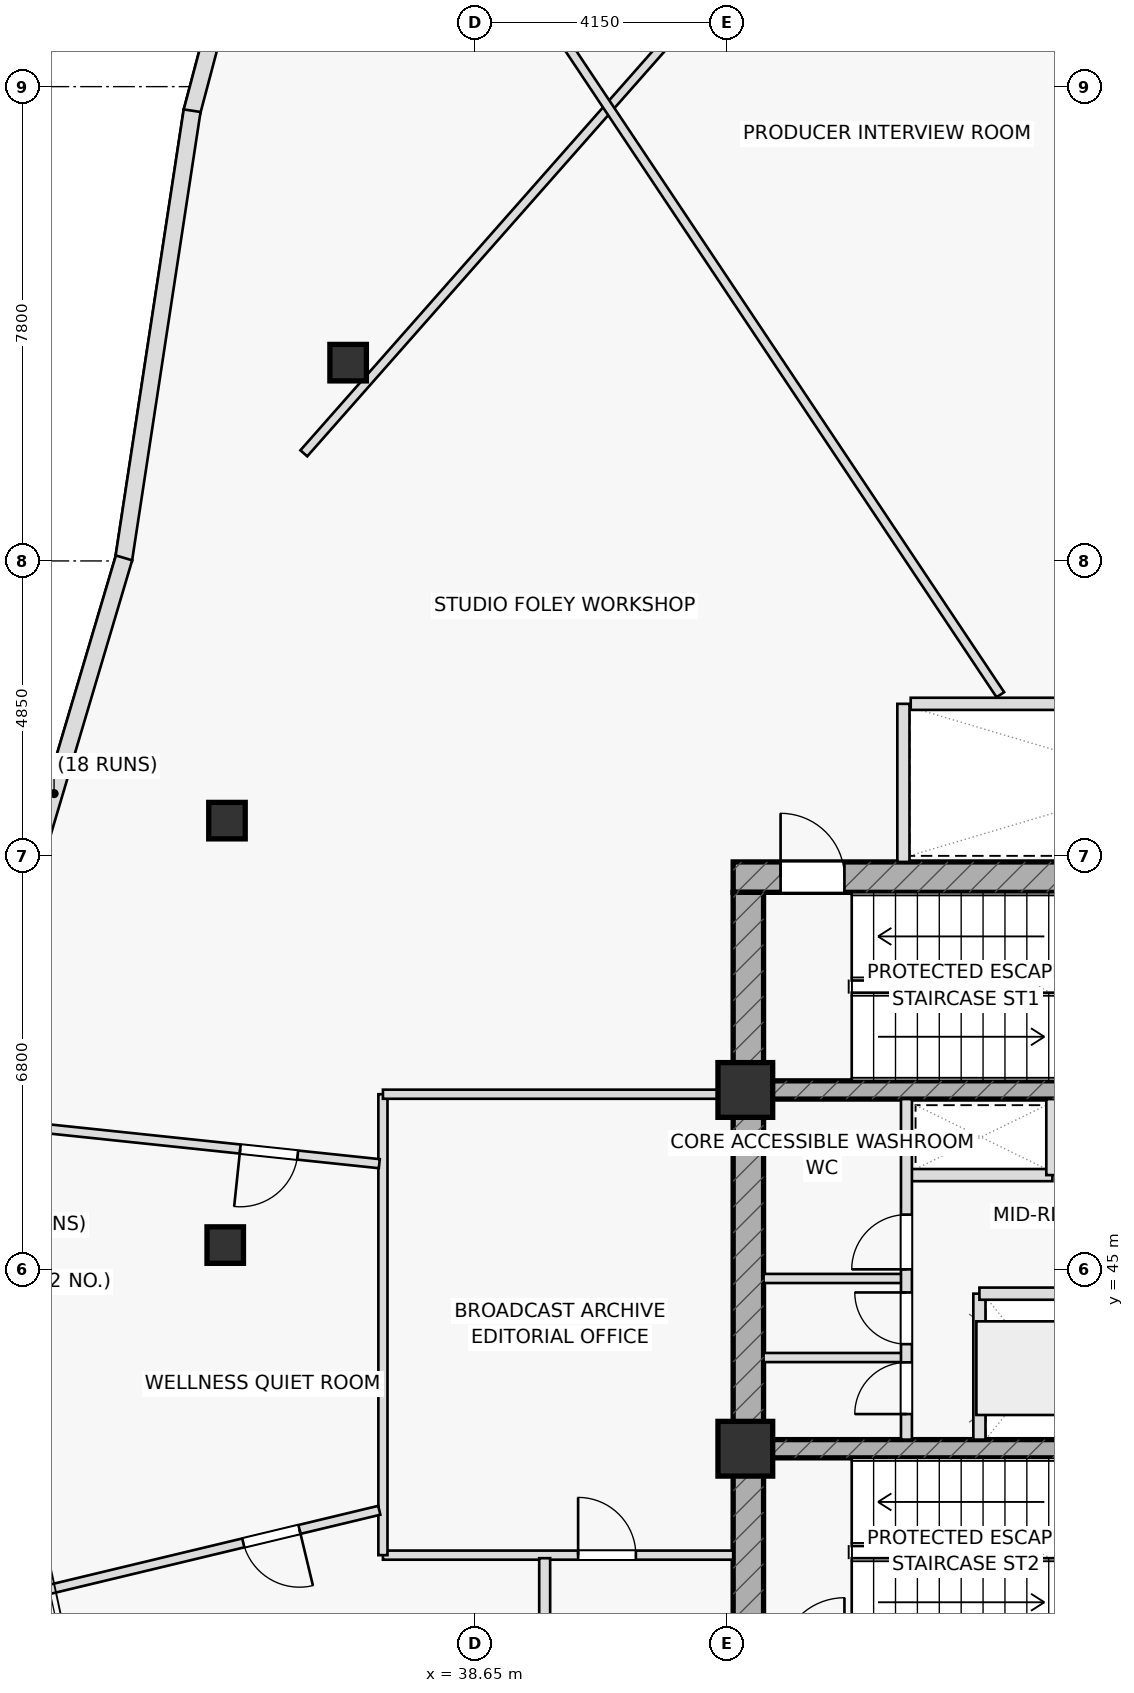
"""IFC4 building model, lengths in metres.
Left out: names, types, materials, properties, quantities, classifications, styles, units other than length and angle.
Written with IfcOpenShell. Run it as: python <this file> out.ifc"""

import sys

from ifc_helpers import new_model, si_unit, direction, frame, frame_2d, origin, origin_2d, place, context, subcontext, project, spatial, rectangle, hollow_rectangle, extrude, element, fill, save


model = new_model("IFC4")
c1 = context("Model", 3, precision=1e-05, world=origin(), true_north=direction((0.0, 1.0)))
c2 = subcontext(c1, "Body", "Model", "MODEL_VIEW")
j1 = project(units=[si_unit("LENGTHUNIT", "METRE"), si_unit("PLANEANGLEUNIT", "RADIAN")], contexts=[c1])
p1 = place(None, origin())
s1 = spatial("IfcSite", under=j1, at=p1, CompositionType="ELEMENT")
p2 = place(p1, origin())
s2 = spatial("IfcBuilding", under=s1, at=p2, CompositionType="ELEMENT")
p3 = place(p2, frame((0.0, 0.0, 196.45)))
s3 = spatial("IfcBuildingStorey", under=s2, at=p3, CompositionType="ELEMENT", Elevation=196.45)
p4 = place(p3, frame((42.9, 51.45, 0.0), z_axis=(0.0, 0.0, 1.0), x_axis=(1.0, 0.0, 0.0)))
e1 = element("IfcWall", 1, at=p4, inside=s3, PredefinedType="SHEAR", context=c2, shape_type="SweptSolid", body=[
    extrude(rectangle(XDim=14.2, YDim=0.5, at=frame_2d((7.1, 0.0))), origin(), (0.0, 0.0, 1.0), 3.55),
])
p5 = place(p4, frame((0.78, 0.0, 0.0)))
e2 = element("IfcOpeningElement", 2, at=p5, cuts=e1, PredefinedType="OPENING", context=c2, shape_type="SweptSolid", body=[
    extrude(rectangle(XDim=1.05, YDim=2.2, at=frame_2d((0.525, 1.1))), frame((0.0, 0.26, 0.0), z_axis=(0.0, -1.0, 0.0), x_axis=(1.0, 0.0, 0.0)), (0.0, 0.0, 1.0), 0.52),
])
p6 = place(p3, frame((43.15, 38.8, 0.0), z_axis=(0.0, 0.0, 1.0), x_axis=(0.0, 1.0, 0.0)))
e3 = element("IfcWall", 3, at=p6, inside=s3, PredefinedType="SHEAR", context=c2, shape_type="SweptSolid", body=[
    extrude(rectangle(XDim=12.4, YDim=0.5, at=frame_2d((6.2, 0.0))), origin(), (0.0, 0.0, 1.0), 3.55),
])
p7 = place(p3, frame((43.4, 47.95, 0.0), z_axis=(0.0, 0.0, 1.0), x_axis=(1.0, 0.0, 0.0)))
e4 = element("IfcWall", 4, at=p7, inside=s3, PredefinedType="SHEAR", context=c2, shape_type="SweptSolid", body=[
    extrude(rectangle(XDim=13.2, YDim=0.3, at=frame_2d((6.6, 0.0))), origin(), (0.0, 0.0, 1.0), 3.55),
])
p8 = place(p7, frame((8.345, 0.0, 0.0)))
e5 = element("IfcOpeningElement", 5, at=p8, cuts=e4, PredefinedType="OPENING", context=c2, shape_type="SweptSolid", body=[
    extrude(rectangle(XDim=1.15, YDim=2.2, at=frame_2d((0.575, 1.1))), frame((0.0, 0.16, 0.0), z_axis=(0.0, -1.0, 0.0), x_axis=(1.0, 0.0, 0.0)), (0.0, 0.0, 1.0), 0.32),
])
p9 = place(p7, frame((10.065, 0.0, 0.0)))
e6 = element("IfcOpeningElement", 6, at=p9, cuts=e4, PredefinedType="OPENING", context=c2, shape_type="SweptSolid", body=[
    extrude(rectangle(XDim=1.15, YDim=2.2, at=frame_2d((0.575, 1.1))), frame((0.0, 0.16, 0.0), z_axis=(0.0, -1.0, 0.0), x_axis=(1.0, 0.0, 0.0)), (0.0, 0.0, 1.0), 0.32),
])
p10 = place(p7, frame((11.645, 0.0, 0.0)))
e7 = element("IfcOpeningElement", 7, at=p10, cuts=e4, PredefinedType="OPENING", context=c2, shape_type="SweptSolid", body=[
    extrude(rectangle(XDim=1.15, YDim=2.2, at=frame_2d((0.575, 1.1))), frame((0.0, 0.16, 0.0), z_axis=(0.0, -1.0, 0.0), x_axis=(1.0, 0.0, 0.0)), (0.0, 0.0, 1.0), 0.32),
])
p11 = place(p3, frame((43.4, 42.05, 0.0), z_axis=(0.0, 0.0, 1.0), x_axis=(1.0, 0.0, 0.0)))
e8 = element("IfcWall", 8, at=p11, inside=s3, PredefinedType="SHEAR", context=c2, shape_type="SweptSolid", body=[
    extrude(rectangle(XDim=13.2, YDim=0.3, at=frame_2d((6.6, 0.0))), origin(), (0.0, 0.0, 1.0), 3.55),
])
p12 = place(p11, frame((8.37, 0.0, 0.0)))
e9 = element("IfcOpeningElement", 9, at=p12, cuts=e8, PredefinedType="OPENING", context=c2, shape_type="SweptSolid", body=[
    extrude(rectangle(XDim=1.1, YDim=2.15, at=frame_2d((0.55, 1.075))), frame((0.0, 0.16, 0.0), z_axis=(0.0, -1.0, 0.0), x_axis=(1.0, 0.0, 0.0)), (0.0, 0.0, 1.0), 0.32),
])
p13 = place(p11, frame((10.09, 0.0, 0.0)))
e10 = element("IfcOpeningElement", 10, at=p13, cuts=e8, PredefinedType="OPENING", context=c2, shape_type="SweptSolid", body=[
    extrude(rectangle(XDim=1.1, YDim=2.15, at=frame_2d((0.55, 1.075))), frame((0.0, 0.16, 0.0), z_axis=(0.0, -1.0, 0.0), x_axis=(1.0, 0.0, 0.0)), (0.0, 0.0, 1.0), 0.32),
])
p14 = place(p11, frame((11.83, 0.0, 0.0)))
e11 = element("IfcOpeningElement", 11, at=p14, cuts=e8, PredefinedType="OPENING", context=c2, shape_type="SweptSolid", body=[
    extrude(rectangle(XDim=1.1, YDim=2.15, at=frame_2d((0.55, 1.075))), frame((0.0, 0.16, 0.0), z_axis=(0.0, -1.0, 0.0), x_axis=(1.0, 0.0, 0.0)), (0.0, 0.0, 1.0), 0.32),
])
for number, where, z_axis, x_axis in (
    (12, (43.1, 47.95, 0.0), (0.0, 0.0, 1.0), (1.0, 0.0, 0.0)),
    (13, (43.1, 42.05, 0.0), (0.0, 0.0, 1.0), (1.0, 0.0, 0.0)),
):
    element("IfcColumn", number, at=place(p3, frame(where, z_axis=z_axis, x_axis=x_axis)), inside=s3, PredefinedType="COLUMN", context=c2, shape_type="SweptSolid", body=[
        extrude(rectangle(XDim=0.9, YDim=0.9, at=origin_2d()), origin(), (0.0, 0.0, 1.0), 3.55),
    ])
for number, where, z_axis, x_axis in (
    (14, (36.568, 59.911, 0.0), (0.0, 0.0, 1.0), (1.0, 0.0, 0.0)),
    (15, (34.575, 52.379, 0.0), (0.0, 0.0, 1.0), (1.0, 0.0, 0.0)),
    (16, (34.546, 45.399, 0.0), (0.0, 0.0, 1.0), (1.0, 0.0, 0.0)),
):
    element("IfcColumn", number, at=place(p3, frame(where, z_axis=z_axis, x_axis=x_axis)), inside=s3, PredefinedType="COLUMN", context=c2, shape_type="SweptSolid", body=[
        extrude(hollow_rectangle(XDim=0.6, YDim=0.6, WallThickness=0.036, at=origin_2d()), origin(), (0.0, 0.0, 1.0), 3.55),
    ])
p15 = place(p3, frame((45.7, 51.7, 0.0), z_axis=(0.0, 0.0, 1.0), x_axis=(0.0, 1.0, 0.0)))
e17 = element("IfcWall", 17, at=p15, inside=s3, PredefinedType="PARTITIONING", context=c2, shape_type="SweptSolid", body=[
    extrude(rectangle(XDim=2.6, YDim=0.2, at=frame_2d((1.3, 0.0))), origin(), (0.0, 0.0, 1.0), 3.55),
])
p16 = place(p3, frame((45.75, 46.55, 0.0), z_axis=(0.0, 0.0, 1.0), x_axis=(1.0, 0.0, 0.0)))
e18 = element("IfcWall", 18, at=p16, inside=s3, PredefinedType="PARTITIONING", context=c2, shape_type="SweptSolid", body=[
    extrude(rectangle(XDim=2.4, YDim=0.2, at=frame_2d((1.2, 0.0))), origin(), (0.0, 0.0, 1.0), 3.55),
])
p17 = place(p3, frame((48.15, 46.55, 0.0), z_axis=(0.0, 0.0, 1.0), x_axis=(0.0, 1.0, 0.0)))
e19 = element("IfcWall", 19, at=p17, inside=s3, PredefinedType="PARTITIONING", context=c2, shape_type="SweptSolid", body=[
    extrude(rectangle(XDim=1.25, YDim=0.2, at=frame_2d((0.625, 0.0))), origin(), (0.0, 0.0, 1.0), 3.55),
])
p18 = place(p3, frame((46.95, 42.2, 0.0), z_axis=(0.0, 0.0, 1.0), x_axis=(0.0, 1.0, 0.0)))
e20 = element("IfcWall", 20, at=p18, inside=s3, PredefinedType="PARTITIONING", context=c2, shape_type="SweptSolid", body=[
    extrude(rectangle(XDim=2.4, YDim=0.2, at=frame_2d((1.2, 0.0))), origin(), (0.0, 0.0, 1.0), 3.55),
])
p19 = place(p3, frame((46.95, 44.6, 0.0), z_axis=(0.0, 0.0, 1.0), x_axis=(1.0, 0.0, 0.0)))
e21 = element("IfcWall", 21, at=p19, inside=s3, PredefinedType="PARTITIONING", context=c2, shape_type="SweptSolid", body=[
    extrude(rectangle(XDim=2.05, YDim=0.2, at=frame_2d((1.025, 0.0))), origin(), (0.0, 0.0, 1.0), 3.55),
])
for number, where, z_axis, x_axis in (
    (22, (43.4, 43.55, 0.0), (0.0, 0.0, 1.0), (1.0, 0.0, 0.0)),
    (23, (43.4, 44.85, 0.0), (0.0, 0.0, 1.0), (1.0, 0.0, 0.0)),
):
    element("IfcWall", number, at=place(p3, frame(where, z_axis=z_axis, x_axis=x_axis)), inside=s3, PredefinedType="PARTITIONING", context=c2, shape_type="SweptSolid", body=[
        extrude(rectangle(XDim=2.35, YDim=0.15, at=frame_2d((1.175, 0.0))), origin(), (0.0, 0.0, 1.0), 3.55),
    ])
p20 = place(p3, frame((45.75, 42.2, 0.0), z_axis=(0.0, 0.0, 1.0), x_axis=(0.0, 1.0, 0.0)))
e24 = element("IfcWall", 24, at=p20, inside=s3, PredefinedType="PARTITIONING", context=c2, shape_type="SweptSolid", body=[
    extrude(rectangle(XDim=5.6, YDim=0.18, at=frame_2d((2.8, 0.0))), origin(), (0.0, 0.0, 1.0), 3.55),
])
p21 = place(p20, frame((0.42, 0.0, 0.0)))
e25 = element("IfcOpeningElement", 25, at=p21, cuts=e24, PredefinedType="OPENING", context=c2, shape_type="SweptSolid", body=[
    extrude(rectangle(XDim=0.85, YDim=2.05, at=frame_2d((0.425, 1.025))), frame((0.0, 0.1, 0.0), z_axis=(0.0, -1.0, 0.0), x_axis=(1.0, 0.0, 0.0)), (0.0, 0.0, 1.0), 0.2),
])
p22 = place(p20, frame((1.57, 0.0, 0.0)))
e26 = element("IfcOpeningElement", 26, at=p22, cuts=e24, PredefinedType="OPENING", context=c2, shape_type="SweptSolid", body=[
    extrude(rectangle(XDim=0.85, YDim=2.05, at=frame_2d((0.425, 1.025))), frame((0.0, 0.1, 0.0), z_axis=(0.0, -1.0, 0.0), x_axis=(1.0, 0.0, 0.0)), (0.0, 0.0, 1.0), 0.2),
])
p23 = place(p20, frame((2.8, 0.0, 0.0)))
e27 = element("IfcOpeningElement", 27, at=p23, cuts=e24, PredefinedType="OPENING", context=c2, shape_type="SweptSolid", body=[
    extrude(rectangle(XDim=0.9, YDim=2.05, at=frame_2d((0.45, 1.025))), frame((0.0, 0.1, 0.0), z_axis=(0.0, -1.0, 0.0), x_axis=(1.0, 0.0, 0.0)), (0.0, 0.0, 1.0), 0.2),
])
p24 = place(p3, frame((43.4, 66.989, 0.0), z_axis=(0.0, 0.0, 1.0), x_axis=(-0.661622343701, -0.749837231881, 0.0)))
e28 = element("IfcWall", 28, at=p24, inside=s3, PredefinedType="PARTITIONING", context=c2, shape_type="SweptSolid", body=[
    extrude(rectangle(XDim=11.427, YDim=0.15, at=frame_2d((5.714, 0.0))), origin(), (0.0, 0.0, 1.0), 2.935),
])
p25 = place(p3, frame((37.14, 40.3, 0.0), z_axis=(0.0, 0.0, 1.0), x_axis=(1.0, 0.0, 0.0)))
e29 = element("IfcWall", 29, at=p25, inside=s3, PredefinedType="PARTITIONING", context=c2, shape_type="SweptSolid", body=[
    extrude(rectangle(XDim=5.76, YDim=0.15, at=frame_2d((2.88, 0.0))), origin(), (0.0, 0.0, 1.0), 3.55),
])
p26 = place(p25, frame((3.21, 0.0, 0.0)))
e30 = element("IfcOpeningElement", 30, at=p26, cuts=e29, PredefinedType="OPENING", context=c2, shape_type="SweptSolid", body=[
    extrude(rectangle(XDim=0.95, YDim=2.05, at=frame_2d((0.475, 1.025))), frame((0.0, 0.085, 0.0), z_axis=(0.0, -1.0, 0.0), x_axis=(1.0, 0.0, 0.0)), (0.0, 0.0, 1.0), 0.17),
])
p27 = place(p3, frame((37.14, 40.3, 0.0), z_axis=(0.0, 0.0, 1.0), x_axis=(0.0, 1.0, 0.0)))
e31 = element("IfcWall", 31, at=p27, inside=s3, PredefinedType="PARTITIONING", context=c2, shape_type="SweptSolid", body=[
    extrude(rectangle(XDim=7.58, YDim=0.15, at=frame_2d((3.79, 0.0))), origin(), (0.0, 0.0, 1.0), 2.935),
])
p28 = place(p3, frame((37.14, 47.88, 0.0), z_axis=(0.0, 0.0, 1.0), x_axis=(1.0, 0.0, 0.0)))
e32 = element("IfcWall", 32, at=p28, inside=s3, PredefinedType="PARTITIONING", context=c2, shape_type="SweptSolid", body=[
    extrude(rectangle(XDim=5.76, YDim=0.15, at=frame_2d((2.88, 0.0))), origin(), (0.0, 0.0, 1.0), 2.935),
])
p29 = place(p3, frame((51.318, 54.45, 0.0), z_axis=(0.0, 0.0, 1.0), x_axis=(-0.2347844954, 0.972047447772, 0.0)))
e33 = element("IfcWall", 33, at=p29, inside=s3, PredefinedType="PARTITIONING", context=c2, shape_type="SweptSolid", body=[
    extrude(rectangle(XDim=13.427, YDim=0.15, at=frame_2d((6.714, 0.0))), origin(), (0.0, 0.0, 1.0), 3.025),
])
p30 = place(p29, frame((1.35, 0.0, 0.0)))
e34 = element("IfcOpeningElement", 34, at=p30, cuts=e33, PredefinedType="OPENING", context=c2, shape_type="SweptSolid", body=[
    extrude(rectangle(XDim=0.95, YDim=2.05, at=frame_2d((0.475, 1.025))), frame((0.0, 0.085, 0.0), z_axis=(0.0, -1.0, 0.0), x_axis=(1.0, 0.0, 0.0)), (0.0, 0.0, 1.0), 0.17),
])
p31 = place(p3, frame((47.294, 54.45, 0.0), z_axis=(0.0, 0.0, 1.0), x_axis=(-0.555036493419, 0.831825998015, 0.0)))
e35 = element("IfcWall", 35, at=p31, inside=s3, PredefinedType="PARTITIONING", context=c2, shape_type="SweptSolid", body=[
    extrude(rectangle(XDim=16.583, YDim=0.15, at=frame_2d((8.292, 0.0))), origin(), (0.0, 0.0, 1.0), 2.935),
])
p32 = place(p3, frame((37.08, 46.738, 0.0), z_axis=(0.0, 0.0, 1.0), x_axis=(-0.994508796095, 0.1046530195, 0.0)))
e36 = element("IfcWall", 36, at=p32, inside=s3, PredefinedType="PARTITIONING", context=c2, shape_type="SweptSolid", body=[
    extrude(rectangle(XDim=6.401, YDim=0.15, at=frame_2d((3.201, 0.0))), origin(), (0.0, 0.0, 1.0), 2.935),
])
p33 = place(p32, frame((1.35, 0.0, 0.0)))
e37 = element("IfcOpeningElement", 37, at=p33, cuts=e36, PredefinedType="OPENING", context=c2, shape_type="SweptSolid", body=[
    extrude(rectangle(XDim=0.95, YDim=2.05, at=frame_2d((0.475, 1.025))), frame((0.0, 0.085, 0.0), z_axis=(0.0, -1.0, 0.0), x_axis=(1.0, 0.0, 0.0)), (0.0, 0.0, 1.0), 0.17),
])
p34 = place(p3, frame((37.08, 41.038, 0.0), z_axis=(0.0, 0.0, 1.0), x_axis=(-0.97241584234, -0.23325400225, 0.0)))
e38 = element("IfcWall", 38, at=p34, inside=s3, PredefinedType="PARTITIONING", context=c2, shape_type="SweptSolid", body=[
    extrude(rectangle(XDim=5.589, YDim=0.15, at=frame_2d((2.794, 0.0))), origin(), (0.0, 0.0, 1.0), 3.025),
])
p35 = place(p34, frame((1.35, 0.0, 0.0)))
e39 = element("IfcOpeningElement", 39, at=p35, cuts=e38, PredefinedType="OPENING", context=c2, shape_type="SweptSolid", body=[
    extrude(rectangle(XDim=0.95, YDim=2.05, at=frame_2d((0.475, 1.025))), frame((0.0, 0.085, 0.0), z_axis=(0.0, -1.0, 0.0), x_axis=(1.0, 0.0, 0.0)), (0.0, 0.0, 1.0), 0.17),
])
p36 = place(p3, frame((39.8, 36.0, 0.0), z_axis=(0.0, 0.0, 1.0), x_axis=(0.0, 1.0, 0.0)))
e40 = element("IfcWall", 40, at=p36, inside=s3, PredefinedType="PARTITIONING", context=c2, shape_type="SweptSolid", body=[
    extrude(rectangle(XDim=4.25, YDim=0.18, at=frame_2d((2.125, 0.0))), origin(), (0.0, 0.0, 1.0), 2.935),
])
p37 = place(p36, frame((1.65, 0.0, 0.0)))
e41 = element("IfcOpeningElement", 41, at=p37, cuts=e40, PredefinedType="OPENING", context=c2, shape_type="SweptSolid", body=[
    extrude(rectangle(XDim=0.95, YDim=2.05, at=frame_2d((0.475, 1.025))), frame((0.0, 0.1, 0.0), z_axis=(0.0, -1.0, 0.0), x_axis=(1.0, 0.0, 0.0)), (0.0, 0.0, 1.0), 0.2),
])
p38 = place(p3, frame((34.495, 65.906, 0.0), z_axis=(0.0, 0.0, 1.0), x_axis=(-0.25626489336, -0.966606592379, 0.0)))
e42 = element("IfcWall", 42, at=p38, inside=s3, PredefinedType="STANDARD", context=c2, shape_type="SweptSolid", body=[
    extrude(rectangle(XDim=1.946, YDim=0.28, at=frame_2d((0.973, 0.0))), origin(), (0.0, 0.0, 1.0), 3.55),
])
p39 = place(p3, frame((34.002, 64.054, 0.0), z_axis=(0.0, 0.0, 1.0), x_axis=(-0.150860798208, -0.988555015952, 0.0)))
e43 = element("IfcWall", 43, at=p39, inside=s3, PredefinedType="STANDARD", context=c2, shape_type="SweptSolid", body=[
    extrude(rectangle(XDim=7.469, YDim=0.28, at=frame_2d((3.734, 0.0))), origin(), (0.0, 0.0, 1.0), 3.55),
])
p40 = place(p3, frame((32.882, 56.7, 0.0), z_axis=(0.0, 0.0, 1.0), x_axis=(-0.284460423916, -0.958687784018, 0.0)))
e44 = element("IfcWall", 44, at=p40, inside=s3, PredefinedType="STANDARD", context=c2, shape_type="SweptSolid", body=[
    extrude(rectangle(XDim=8.086, YDim=0.28, at=frame_2d((4.043, 0.0))), origin(), (0.0, 0.0, 1.0), 3.55),
])
p41 = place(p3, frame((45.82, 54.3, 0.0), z_axis=(0.0, 0.0, 1.0), x_axis=(1.0, 0.0, 0.0)))
e45 = element("IfcWall", 45, at=p41, inside=s3, PredefinedType="PARTITIONING", context=c2, shape_type="SweptSolid", body=[
    extrude(rectangle(XDim=8.31, YDim=0.2, at=frame_2d((4.155, 0.0))), origin(), (0.0, 0.0, 1.0), 3.55),
])
p42 = place(p5, origin())
e46 = element("IfcDoor", 46, at=p42, inside=s3, OperationType="SINGLE_SWING_LEFT", PredefinedType="DOOR", context=c2, shape_type="SweptSolid", body=[
    extrude(rectangle(XDim=1.05, YDim=2.2, at=frame_2d((0.525, 1.1))), frame((0.0, 0.025, 0.0), z_axis=(0.0, -1.0, 0.0), x_axis=(1.0, 0.0, 0.0)), (0.0, 0.0, 1.0), 0.05),
])
fill(e2, e46)
p43 = place(p21, origin())
e47 = element("IfcDoor", 47, at=p43, inside=s3, OperationType="SINGLE_SWING_LEFT", PredefinedType="DOOR", context=c2, shape_type="SweptSolid", body=[
    extrude(rectangle(XDim=0.85, YDim=2.05, at=frame_2d((0.425, 1.025))), frame((0.0, 0.025, 0.0), z_axis=(0.0, -1.0, 0.0), x_axis=(1.0, 0.0, 0.0)), (0.0, 0.0, 1.0), 0.05),
])
fill(e25, e47)
p44 = place(p22, origin())
e48 = element("IfcDoor", 48, at=p44, inside=s3, OperationType="SINGLE_SWING_RIGHT", PredefinedType="DOOR", context=c2, shape_type="SweptSolid", body=[
    extrude(rectangle(XDim=0.85, YDim=2.05, at=frame_2d((0.425, 1.025))), frame((0.0, 0.025, 0.0), z_axis=(0.0, -1.0, 0.0), x_axis=(1.0, 0.0, 0.0)), (0.0, 0.0, 1.0), 0.05),
])
fill(e26, e48)
p45 = place(p23, origin())
e49 = element("IfcDoor", 49, at=p45, inside=s3, OperationType="SINGLE_SWING_LEFT", PredefinedType="DOOR", context=c2, shape_type="SweptSolid", body=[
    extrude(rectangle(XDim=0.9, YDim=2.05, at=frame_2d((0.45, 1.025))), frame((0.0, 0.025, 0.0), z_axis=(0.0, -1.0, 0.0), x_axis=(1.0, 0.0, 0.0)), (0.0, 0.0, 1.0), 0.05),
])
fill(e27, e49)
p46 = place(p26, origin())
e50 = element("IfcDoor", 50, at=p46, inside=s3, OperationType="SINGLE_SWING_LEFT", PredefinedType="DOOR", context=c2, shape_type="SweptSolid", body=[
    extrude(rectangle(XDim=0.95, YDim=2.05, at=frame_2d((0.475, 1.025))), frame((0.0, 0.025, 0.0), z_axis=(0.0, -1.0, 0.0), x_axis=(1.0, 0.0, 0.0)), (0.0, 0.0, 1.0), 0.05),
])
fill(e30, e50)
p47 = place(p33, origin())
e51 = element("IfcDoor", 51, at=p47, inside=s3, OperationType="SINGLE_SWING_RIGHT", PredefinedType="DOOR", context=c2, shape_type="SweptSolid", body=[
    extrude(rectangle(XDim=0.95, YDim=2.05, at=frame_2d((0.475, 1.025))), frame((0.0, 0.025, 0.0), z_axis=(0.0, -1.0, 0.0), x_axis=(1.0, 0.0, 0.0)), (0.0, 0.0, 1.0), 0.05),
])
fill(e37, e51)
p48 = place(p35, origin())
e52 = element("IfcDoor", 52, at=p48, inside=s3, OperationType="SINGLE_SWING_LEFT", PredefinedType="DOOR", context=c2, shape_type="SweptSolid", body=[
    extrude(rectangle(XDim=0.95, YDim=2.05, at=frame_2d((0.475, 1.025))), frame((0.0, 0.025, 0.0), z_axis=(0.0, -1.0, 0.0), x_axis=(1.0, 0.0, 0.0)), (0.0, 0.0, 1.0), 0.05),
])
fill(e39, e52)
save(model, sys.argv[1])
